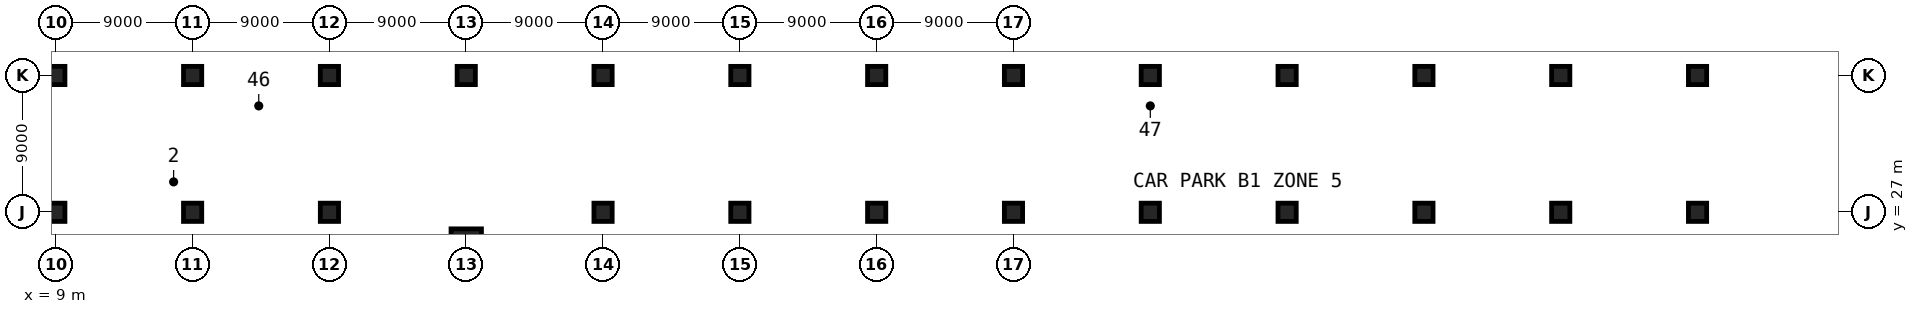
"""IFC4 building model, lengths in metres.
Left out: names, types, materials, properties, quantities, classifications, styles, units other than length and angle.
Written with IfcOpenShell. Run it as: python <this file> out.ifc"""

import sys

from ifc_helpers import new_model, si_unit, direction, frame, origin, origin_2d, place, context, subcontext, project, spatial, rectangle, extrude, element, save


model = new_model("IFC4")
c1 = context("Model", 3, precision=1e-05, world=origin(), true_north=direction((0.0, 1.0)))
c2 = subcontext(c1, "Body", "Model", "MODEL_VIEW")
j1 = project(units=[si_unit("LENGTHUNIT", "METRE"), si_unit("PLANEANGLEUNIT", "RADIAN")], contexts=[c1])
p1 = place(None, origin())
s1 = spatial("IfcSite", under=j1, at=p1, CompositionType="ELEMENT")
p2 = place(p1, origin())
s2 = spatial("IfcBuilding", under=s1, at=p2, CompositionType="ELEMENT")
p3 = place(p2, frame((0.0, 0.0, -4.5)))
s3 = spatial("IfcBuildingStorey", under=s2, at=p3, CompositionType="ELEMENT", Elevation=-4.5)
for number, where, z_axis, x_axis in (
    (1, (9.0, 27.0, 0.0), (0.0, 0.0, 1.0), (1.0, 0.0, 0.0)),
    (2, (9.0, 36.0, 0.0), (0.0, 0.0, 1.0), (1.0, 0.0, 0.0)),
    (3, (18.0, 27.0, 0.0), (0.0, 0.0, 1.0), (1.0, 0.0, 0.0)),
    (4, (18.0, 36.0, 0.0), (0.0, 0.0, 1.0), (1.0, 0.0, 0.0)),
    (5, (27.0, 27.0, 0.0), (0.0, 0.0, 1.0), (1.0, 0.0, 0.0)),
    (6, (27.0, 36.0, 0.0), (0.0, 0.0, 1.0), (1.0, 0.0, 0.0)),
    (7, (36.0, 36.0, 0.0), (0.0, 0.0, 1.0), (1.0, 0.0, 0.0)),
    (8, (45.0, 27.0, 0.0), (0.0, 0.0, 1.0), (1.0, 0.0, 0.0)),
    (9, (45.0, 36.0, 0.0), (0.0, 0.0, 1.0), (1.0, 0.0, 0.0)),
    (10, (54.0, 27.0, 0.0), (0.0, 0.0, 1.0), (1.0, 0.0, 0.0)),
    (11, (54.0, 36.0, 0.0), (0.0, 0.0, 1.0), (1.0, 0.0, 0.0)),
    (12, (63.0, 27.0, 0.0), (0.0, 0.0, 1.0), (1.0, 0.0, 0.0)),
    (13, (63.0, 36.0, 0.0), (0.0, 0.0, 1.0), (1.0, 0.0, 0.0)),
    (14, (72.0, 27.0, 0.0), (0.0, 0.0, 1.0), (1.0, 0.0, 0.0)),
    (15, (72.0, 36.0, 0.0), (0.0, 0.0, 1.0), (1.0, 0.0, 0.0)),
    (16, (81.0, 27.0, 0.0), (0.0, 0.0, 1.0), (1.0, 0.0, 0.0)),
    (17, (81.0, 36.0, 0.0), (0.0, 0.0, 1.0), (1.0, 0.0, 0.0)),
    (18, (90.0, 27.0, 0.0), (0.0, 0.0, 1.0), (1.0, 0.0, 0.0)),
    (19, (90.0, 36.0, 0.0), (0.0, 0.0, 1.0), (1.0, 0.0, 0.0)),
    (20, (99.0, 27.0, 0.0), (0.0, 0.0, 1.0), (1.0, 0.0, 0.0)),
    (21, (99.0, 36.0, 0.0), (0.0, 0.0, 1.0), (1.0, 0.0, 0.0)),
    (22, (108.0, 27.0, 0.0), (0.0, 0.0, 1.0), (1.0, 0.0, 0.0)),
    (23, (108.0, 36.0, 0.0), (0.0, 0.0, 1.0), (1.0, 0.0, 0.0)),
    (24, (117.0, 27.0, 0.0), (0.0, 0.0, 1.0), (1.0, 0.0, 0.0)),
    (25, (117.0, 36.0, 0.0), (0.0, 0.0, 1.0), (1.0, 0.0, 0.0)),
):
    element("IfcColumn", number, at=place(p3, frame(where, z_axis=z_axis, x_axis=x_axis)), inside=s3, PredefinedType="COLUMN", context=c2, shape_type="SweptSolid", body=[
        extrude(rectangle(XDim=1.2, YDim=1.2, at=origin_2d()), origin(), (0.0, 0.0, 1.0), 4.5),
    ])
p4 = place(p3, frame((36.0, 24.91, 0.0), z_axis=(0.0, 0.0, 1.0), x_axis=(0.0, 1.0, 0.0)))
e26 = element("IfcColumn", 26, at=p4, inside=s3, PredefinedType="COLUMN", context=c2, shape_type="SweptSolid", body=[
    extrude(rectangle(XDim=2.0, YDim=2.0, at=origin_2d()), origin(), (0.0, 0.0, 1.0), 4.5),
])
save(model, sys.argv[1])
